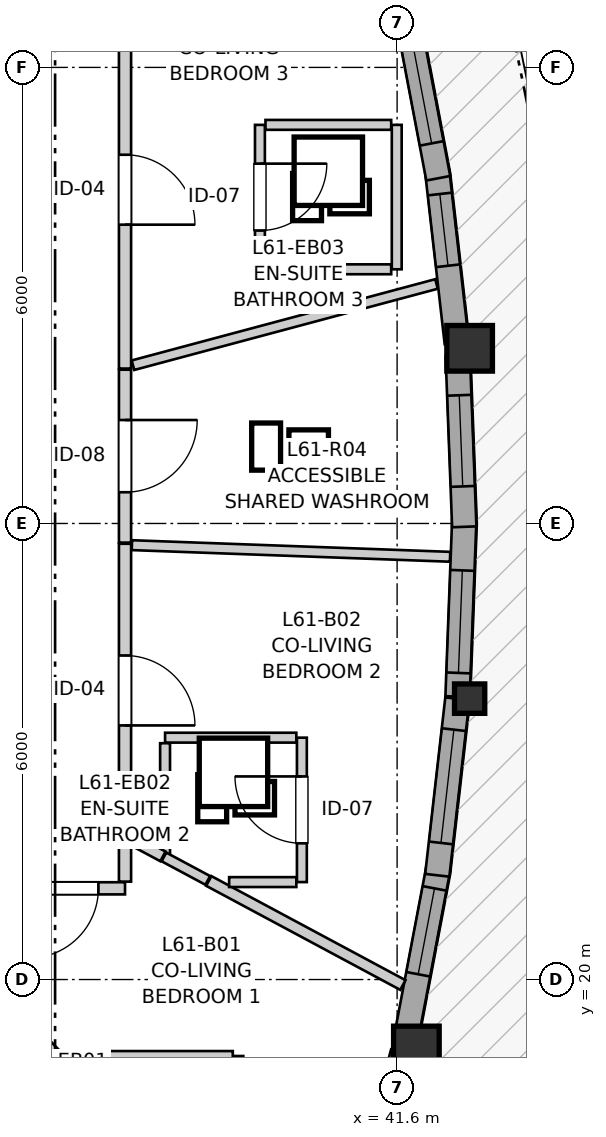
"""IFC4 building model, lengths in metres.
Left out: names, types, materials, properties, quantities, classifications, styles, units other than length and angle.
Written with IfcOpenShell. Run it as: python <this file> out.ifc"""

import sys

from ifc_helpers import new_model, si_unit, direction, frame, frame_2d, origin, origin_2d, place, context, subcontext, project, spatial, rectangle, i_section, extrude, source, transform, mapped, element, fill, save


model = new_model("IFC4")
c1 = context("Model", 3, precision=1e-05, world=origin(), true_north=direction((0.0, 1.0)))
c2 = subcontext(c1, "Body", "Model", "MODEL_VIEW")
j1 = project(units=[si_unit("LENGTHUNIT", "METRE"), si_unit("PLANEANGLEUNIT", "RADIAN")], contexts=[c1])
p1 = place(None, origin())
s1 = spatial("IfcSite", under=j1, at=p1, CompositionType="ELEMENT")
p2 = place(p1, origin())
s2 = spatial("IfcBuilding", under=s1, at=p2, CompositionType="ELEMENT")
p3 = place(p2, frame((0.0, 0.0, 205.2)))
s3 = spatial("IfcBuildingStorey", under=s2, at=p3, CompositionType="ELEMENT", Elevation=205.2)
m1 = source(origin(), c2, "Body", "SweptSolid", [
    extrude(rectangle(XDim=0.6, YDim=0.6, at=origin_2d()), origin(), (0.0, 0.0, 1.0), 2.935),
])
p4 = place(p3, frame((41.854, 19.086, 0.0), z_axis=(0.0, 0.0, 1.0), x_axis=(1.0, 0.0, 0.0)))
e1 = element("IfcColumn", 1, at=p4, inside=s3, PredefinedType="COLUMN", context=c2, shape_type="MappedRepresentation", body=[
    mapped(m1, transform((0.0, 0.0, 0.0), x_axis=(1.0, 0.0, 0.0), y_axis=(0.0, 1.0, 0.0), z_axis=(0.0, 0.0, 1.0), scale=1.0)),
])
m2 = source(origin(), c2, "Body", "SweptSolid", [
    extrude(i_section(OverallWidth=0.398, OverallDepth=0.387, WebThickness=0.019, FlangeThickness=0.03, FilletRadius=0.015, at=origin_2d()), origin(), (0.0, 0.0, 1.0), 2.935),
])
p5 = place(p3, frame((42.554, 23.696, 0.0), z_axis=(0.0, 0.0, 1.0), x_axis=(1.0, 0.0, 0.0)))
e2 = element("IfcColumn", 2, at=p5, inside=s3, PredefinedType="PILASTER", context=c2, shape_type="MappedRepresentation", body=[
    mapped(m2, transform((0.0, 0.0, 0.0), x_axis=(1.0, 0.0, 0.0), y_axis=(0.0, 1.0, 0.0), z_axis=(0.0, 0.0, 1.0), scale=1.0)),
])
p6 = place(p3, frame((42.554, 28.304, 0.0), z_axis=(0.0, 0.0, 1.0), x_axis=(1.0, 0.0, 0.0)))
e3 = element("IfcColumn", 3, at=p6, inside=s3, PredefinedType="COLUMN", context=c2, shape_type="MappedRepresentation", body=[
    mapped(m1, transform((0.0, 0.0, 0.0), x_axis=(1.0, 0.0, 0.0), y_axis=(0.0, 1.0, 0.0), z_axis=(0.0, 0.0, 1.0), scale=1.0)),
])
p7 = place(p3, frame((41.076, 16.786, 0.0), z_axis=(0.0, 0.0, 1.0), x_axis=(0.257037260973, 0.966401493413, 0.0)))
e4 = element("IfcWall", 4, at=p7, inside=s3, PredefinedType="SOLIDWALL", context=c2, shape_type="SweptSolid", body=[
    extrude(rectangle(XDim=2.333, YDim=0.32, at=frame_2d((1.167, 0.0))), origin(), (0.0, 0.0, 1.0), 2.555),
])
p8 = place(p7, frame((0.446, 0.0, 0.82)))
e5 = element("IfcOpeningElement", 5, at=p8, cuts=e4, PredefinedType="OPENING", context=c2, shape_type="SweptSolid", body=[
    extrude(rectangle(XDim=1.45, YDim=1.25, at=frame_2d((0.725, 0.625))), frame((0.0, 0.17, 0.0), z_axis=(0.0, -1.0, 0.0), x_axis=(1.0, 0.0, 0.0)), (0.0, 0.0, 1.0), 0.34),
])
p9 = place(p3, frame((41.713, 19.205, 0.0), z_axis=(0.0, 0.0, 1.0), x_axis=(0.186691464441, 0.982418595663, 0.0)))
e6 = element("IfcWall", 6, at=p9, inside=s3, PredefinedType="SOLIDWALL", context=c2, shape_type="SweptSolid", body=[
    extrude(rectangle(XDim=2.294, YDim=0.32, at=frame_2d((1.147, 0.0))), origin(), (0.0, 0.0, 1.0), 2.555),
])
p10 = place(p9, frame((0.88, 0.0, 0.82)))
e7 = element("IfcOpeningElement", 7, at=p10, cuts=e6, PredefinedType="OPENING", context=c2, shape_type="SweptSolid", body=[
    extrude(rectangle(XDim=1.15, YDim=1.2, at=frame_2d((0.575, 0.6))), frame((0.0, 0.17, 0.0), z_axis=(0.0, -1.0, 0.0), x_axis=(1.0, 0.0, 0.0)), (0.0, 0.0, 1.0), 0.34),
])
p11 = place(p3, frame((42.128, 21.371, 0.0), z_axis=(0.0, 0.0, 1.0), x_axis=(0.113319777802, 0.993558567956, 0.0)))
e8 = element("IfcWall", 8, at=p11, inside=s3, PredefinedType="SOLIDWALL", context=c2, shape_type="SweptSolid", body=[
    extrude(rectangle(XDim=2.338, YDim=0.32, at=frame_2d((1.169, 0.0))), origin(), (0.0, 0.0, 1.0), 2.555),
])
p12 = place(p11, frame((0.429, 0.0, 0.82)))
e9 = element("IfcOpeningElement", 9, at=p12, cuts=e8, PredefinedType="OPENING", context=c2, shape_type="SweptSolid", body=[
    extrude(rectangle(XDim=1.5, YDim=1.45, at=frame_2d((0.75, 0.725))), frame((0.0, 0.17, 0.0), z_axis=(0.0, -1.0, 0.0), x_axis=(1.0, 0.0, 0.0)), (0.0, 0.0, 1.0), 0.34),
])
p13 = place(p3, frame((42.395, 23.722, 0.0), z_axis=(0.0, 0.0, 1.0), x_axis=(0.038025668885, 0.999276762717, 0.0)))
e10 = element("IfcWall", 10, at=p13, inside=s3, PredefinedType="SOLIDWALL", context=c2, shape_type="SweptSolid", body=[
    extrude(rectangle(XDim=2.324, YDim=0.32, at=frame_2d((1.162, 0.0))), origin(), (0.0, 0.0, 1.0), 2.555),
])
p14 = place(p13, frame((0.312, 0.0, 0.82)))
e11 = element("IfcOpeningElement", 11, at=p14, cuts=e10, PredefinedType="OPENING", context=c2, shape_type="SweptSolid", body=[
    extrude(rectangle(XDim=1.35, YDim=1.45, at=frame_2d((0.675, 0.725))), frame((0.0, 0.17, 0.0), z_axis=(0.0, -1.0, 0.0), x_axis=(1.0, 0.0, 0.0)), (0.0, 0.0, 1.0), 0.34),
])
p15 = place(p3, frame((42.483, 25.956, 0.0), z_axis=(0.0, 0.0, 1.0), x_axis=(-0.038013039165, 0.999277243238, 0.0)))
e12 = element("IfcWall", 12, at=p15, inside=s3, PredefinedType="SOLIDWALL", context=c2, shape_type="SweptSolid", body=[
    extrude(rectangle(XDim=2.254, YDim=0.32, at=frame_2d((1.127, 0.0))), origin(), (0.0, 0.0, 1.0), 2.555),
])
p16 = place(p15, frame((0.532, 0.0, 0.82)))
e13 = element("IfcOpeningElement", 13, at=p16, cuts=e12, PredefinedType="OPENING", context=c2, shape_type="SweptSolid", body=[
    extrude(rectangle(XDim=1.2, YDim=1.45, at=frame_2d((0.6, 0.725))), frame((0.0, 0.17, 0.0), z_axis=(0.0, -1.0, 0.0), x_axis=(1.0, 0.0, 0.0)), (0.0, 0.0, 1.0), 0.34),
])
p17 = place(p3, frame((42.385, 28.376, 0.0), z_axis=(0.0, 0.0, 1.0), x_axis=(-0.113267221285, 0.993564560853, 0.0)))
e14 = element("IfcWall", 14, at=p17, inside=s3, PredefinedType="SOLIDWALL", context=c2, shape_type="SweptSolid", body=[
    extrude(rectangle(XDim=2.268, YDim=0.32, at=frame_2d((1.134, 0.0))), origin(), (0.0, 0.0, 1.0), 2.555),
])
p18 = place(p17, frame((1.021, 0.0, 0.82)))
e15 = element("IfcOpeningElement", 15, at=p18, cuts=e14, PredefinedType="OPENING", context=c2, shape_type="SweptSolid", body=[
    extrude(rectangle(XDim=0.95, YDim=1.35, at=frame_2d((0.475, 0.675))), frame((0.0, 0.17, 0.0), z_axis=(0.0, -1.0, 0.0), x_axis=(1.0, 0.0, 0.0)), (0.0, 0.0, 1.0), 0.34),
])
p19 = place(p3, frame((42.141, 30.542, 0.0), z_axis=(0.0, 0.0, 1.0), x_axis=(-0.186632734065, 0.982429754525, 0.0)))
e16 = element("IfcWall", 16, at=p19, inside=s3, PredefinedType="SOLIDWALL", context=c2, shape_type="SweptSolid", body=[
    extrude(rectangle(XDim=2.364, YDim=0.32, at=frame_2d((1.182, 0.0))), origin(), (0.0, 0.0, 1.0), 2.555),
])
p20 = place(p19, frame((0.467, 0.0, 0.82)))
e17 = element("IfcOpeningElement", 17, at=p20, cuts=e16, PredefinedType="OPENING", context=c2, shape_type="SweptSolid", body=[
    extrude(rectangle(XDim=1.45, YDim=1.25, at=frame_2d((0.725, 0.625))), frame((0.0, 0.17, 0.0), z_axis=(0.0, -1.0, 0.0), x_axis=(1.0, 0.0, 0.0)), (0.0, 0.0, 1.0), 0.34),
])
p21 = place(p3, frame((38.02, 32.748, 0.0), z_axis=(0.0, 0.0, 1.0), x_axis=(0.0, -1.0, 0.0)))
e18 = element("IfcWall", 18, at=p21, inside=s3, PredefinedType="PARTITIONING", context=c2, shape_type="SweptSolid", body=[
    extrude(rectangle(XDim=4.71, YDim=0.16, at=frame_2d((2.355, 0.0))), origin(), (0.0, 0.0, 1.0), 2.603),
])
p22 = place(p21, frame((1.897, 0.0, 0.0)))
e19 = element("IfcOpeningElement", 19, at=p22, cuts=e18, PredefinedType="OPENING", context=c2, shape_type="SweptSolid", body=[
    extrude(rectangle(XDim=0.92, YDim=2.1, at=frame_2d((0.46, 1.05))), frame((0.0, 0.09, 0.0), z_axis=(0.0, -1.0, 0.0), x_axis=(1.0, 0.0, 0.0)), (0.0, 0.0, 1.0), 0.18),
])
p23 = place(p3, frame((38.02, 25.733, 0.0), z_axis=(0.0, 0.0, 1.0), x_axis=(0.0, -1.0, 0.0)))
e20 = element("IfcWall", 20, at=p23, inside=s3, PredefinedType="PARTITIONING", context=c2, shape_type="SweptSolid", body=[
    extrude(rectangle(XDim=3.862, YDim=0.16, at=frame_2d((1.931, 0.0))), origin(), (0.0, 0.0, 1.0), 2.935),
])
p24 = place(p23, frame((1.47, 0.0, 0.0)))
e21 = element("IfcOpeningElement", 21, at=p24, cuts=e20, PredefinedType="OPENING", context=c2, shape_type="SweptSolid", body=[
    extrude(rectangle(XDim=0.92, YDim=2.1, at=frame_2d((0.46, 1.05))), frame((0.0, 0.09, 0.0), z_axis=(0.0, -1.0, 0.0), x_axis=(1.0, 0.0, 0.0)), (0.0, 0.0, 1.0), 0.18),
])
p25 = place(p3, frame((38.02, 28.023, 0.0), z_axis=(0.0, 0.0, 1.0), x_axis=(0.0, -1.0, 0.0)))
e22 = element("IfcWall", 22, at=p25, inside=s3, PredefinedType="PARTITIONING", context=c2, shape_type="SweptSolid", body=[
    extrude(rectangle(XDim=2.275, YDim=0.16, at=frame_2d((1.137, 0.0))), origin(), (0.0, 0.0, 1.0), 2.935),
])
p26 = place(p25, frame((0.662, 0.0, 0.0)))
e23 = element("IfcOpeningElement", 23, at=p26, cuts=e22, PredefinedType="OPENING", context=c2, shape_type="SweptSolid", body=[
    extrude(rectangle(XDim=0.95, YDim=2.1, at=frame_2d((0.475, 1.05))), frame((0.0, 0.09, 0.0), z_axis=(0.0, -1.0, 0.0), x_axis=(1.0, 0.0, 0.0)), (0.0, 0.0, 1.0), 0.18),
])
p27 = place(p3, frame((39.511, 17.094, 0.0), z_axis=(0.0, 0.0, 1.0), x_axis=(0.0, 1.0, 0.0)))
e24 = element("IfcWall", 24, at=p27, inside=s3, PredefinedType="PARTITIONING", context=c2, shape_type="SweptSolid", body=[
    extrude(rectangle(XDim=1.9, YDim=0.13, at=frame_2d((0.95, 0.0))), origin(), (0.0, 0.0, 1.0), 2.935),
])
p28 = place(p27, frame((0.51, 0.0, 0.0)))
e25 = element("IfcOpeningElement", 25, at=p28, cuts=e24, PredefinedType="OPENING", context=c2, shape_type="SweptSolid", body=[
    extrude(rectangle(XDim=0.88, YDim=2.05, at=frame_2d((0.44, 1.025))), frame((0.0, 0.075, 0.0), z_axis=(0.0, -1.0, 0.0), x_axis=(1.0, 0.0, 0.0)), (0.0, 0.0, 1.0), 0.15),
])
p29 = place(p3, frame((40.347, 21.282, 0.0), z_axis=(0.0, 0.0, 1.0), x_axis=(0.0, 1.0, 0.0)))
e26 = element("IfcWall", 26, at=p29, inside=s3, PredefinedType="PARTITIONING", context=c2, shape_type="SweptSolid", body=[
    extrude(rectangle(XDim=1.9, YDim=0.13, at=frame_2d((0.95, 0.0))), origin(), (0.0, 0.0, 1.0), 2.573),
])
p30 = place(p29, frame((0.51, 0.0, 0.0)))
e27 = element("IfcOpeningElement", 27, at=p30, cuts=e26, PredefinedType="OPENING", context=c2, shape_type="SweptSolid", body=[
    extrude(rectangle(XDim=0.88, YDim=2.05, at=frame_2d((0.44, 1.025))), frame((0.0, 0.075, 0.0), z_axis=(0.0, -1.0, 0.0), x_axis=(1.0, 0.0, 0.0)), (0.0, 0.0, 1.0), 0.15),
])
p31 = place(p3, frame((39.795, 31.244, 0.0), z_axis=(0.0, 0.0, 1.0), x_axis=(0.0, -1.0, 0.0)))
e28 = element("IfcWall", 28, at=p31, inside=s3, PredefinedType="PARTITIONING", context=c2, shape_type="SweptSolid", body=[
    extrude(rectangle(XDim=1.9, YDim=0.13, at=frame_2d((0.95, 0.0))), origin(), (0.0, 0.0, 1.0), 2.573),
])
p32 = place(p31, frame((0.51, 0.0, 0.0)))
e29 = element("IfcOpeningElement", 29, at=p32, cuts=e28, PredefinedType="OPENING", context=c2, shape_type="SweptSolid", body=[
    extrude(rectangle(XDim=0.88, YDim=2.05, at=frame_2d((0.44, 1.025))), frame((0.0, 0.075, 0.0), z_axis=(0.0, -1.0, 0.0), x_axis=(1.0, 0.0, 0.0)), (0.0, 0.0, 1.0), 0.15),
])
p33 = place(p3, frame((38.02, 21.2, 0.0), z_axis=(0.0, 0.0, 1.0), x_axis=(-1.0, 0.0, 0.0)))
e30 = element("IfcWall", 30, at=p33, inside=s3, PredefinedType="PARTITIONING", context=c2, shape_type="SweptSolid", body=[
    extrude(rectangle(XDim=1.612, YDim=0.16, at=frame_2d((0.806, 0.0))), origin(), (0.0, 0.0, 1.0), 2.935),
])
p34 = place(p33, frame((0.35, 0.0, 0.0)))
e31 = element("IfcOpeningElement", 31, at=p34, cuts=e30, PredefinedType="OPENING", context=c2, shape_type="SweptSolid", body=[
    extrude(rectangle(XDim=0.92, YDim=2.1, at=frame_2d((0.46, 1.05))), frame((0.0, 0.09, 0.0), z_axis=(0.0, -1.0, 0.0), x_axis=(1.0, 0.0, 0.0)), (0.0, 0.0, 1.0), 0.18),
])
p35 = place(p3, frame((38.11, 25.715, 0.0), z_axis=(0.0, 0.0, 1.0), x_axis=(0.99933433165, -0.036481414253, 0.0)))
e32 = element("IfcWall", 32, at=p35, inside=s3, PredefinedType="PARTITIONING", context=c2, shape_type="SweptSolid", body=[
    extrude(rectangle(XDim=4.189, YDim=0.13, at=frame_2d((2.095, 0.0))), origin(), (0.0, 0.0, 1.0), 2.935),
])
p36 = place(p3, frame((38.125, 28.082, 0.0), z_axis=(0.0, 0.0, 1.0), x_axis=(0.965997321458, 0.258552073934, 0.0)))
e33 = element("IfcWall", 33, at=p36, inside=s3, PredefinedType="PARTITIONING", context=c2, shape_type="SweptSolid", body=[
    extrude(rectangle(XDim=4.134, YDim=0.13, at=frame_2d((2.067, 0.0))), origin(), (0.0, 0.0, 1.0), 2.935),
])
p37 = place(p3, frame((39.122, 21.297, 0.0), z_axis=(0.0, 0.0, 1.0), x_axis=(0.881308328415, -0.472541670402, 0.0)))
e34 = element("IfcWall", 34, at=p37, inside=s3, PredefinedType="PARTITIONING", context=c2, shape_type="SweptSolid", body=[
    extrude(rectangle(XDim=2.898, YDim=0.145, at=frame_2d((1.449, 0.0))), origin(), (0.0, 0.0, 1.0), 2.935),
])
p38 = place(p3, frame((36.458, 19.686, 0.0), z_axis=(0.0, 0.0, 1.0), x_axis=(0.695231916786, -0.718785490868, 0.0)))
e35 = element("IfcWall", 35, at=p38, inside=s3, PredefinedType="PARTITIONING", context=c2, shape_type="SweptSolid", body=[
    extrude(rectangle(XDim=1.824, YDim=0.145, at=frame_2d((0.912, 0.0))), origin(), (0.0, 0.0, 1.0), 2.935),
])
p39 = place(p3, frame((41.595, 29.344, 0.0), z_axis=(0.0, 0.0, 1.0), x_axis=(0.0, 1.0, 0.0)))
e36 = element("IfcWall", 36, at=p39, inside=s3, PredefinedType="PARTITIONING", context=c2, shape_type="SweptSolid", body=[
    extrude(rectangle(XDim=1.9, YDim=0.13, at=frame_2d((0.95, 0.0))), origin(), (0.0, 0.0, 1.0), 2.935),
])
p40 = place(p3, frame((37.711, 18.994, 0.0), z_axis=(0.0, 0.0, 1.0), x_axis=(1.0, 0.0, 0.0)))
e37 = element("IfcWall", 37, at=p40, inside=s3, PredefinedType="PARTITIONING", context=c2, shape_type="SweptSolid", body=[
    extrude(rectangle(XDim=1.727, YDim=0.13, at=frame_2d((0.864, 0.0))), origin(), (0.0, 0.0, 1.0), 2.935),
])
p41 = place(p3, frame((38.547, 23.182, 0.0), z_axis=(0.0, 0.0, 1.0), x_axis=(1.0, 0.0, 0.0)))
e38 = element("IfcWall", 38, at=p41, inside=s3, PredefinedType="PARTITIONING", context=c2, shape_type="SweptSolid", body=[
    extrude(rectangle(XDim=1.727, YDim=0.13, at=frame_2d((0.863, 0.0))), origin(), (0.0, 0.0, 1.0), 2.935),
])
for number, where, z_axis, x_axis in (
    (39, (39.868, 31.244, 0.0), (0.0, 0.0, 1.0), (1.0, 0.0, 0.0)),
    (40, (39.868, 29.344, 0.0), (0.0, 0.0, 1.0), (1.0, 0.0, 0.0)),
):
    element("IfcWall", number, at=place(p3, frame(where, z_axis=z_axis, x_axis=x_axis)), inside=s3, PredefinedType="PARTITIONING", context=c2, shape_type="SweptSolid", body=[
        extrude(rectangle(XDim=1.654, YDim=0.13, at=frame_2d((0.827, 0.0))), origin(), (0.0, 0.0, 1.0), 2.935),
    ])
p42 = place(p3, frame((38.547, 21.605, 0.0), z_axis=(0.0, 0.0, 1.0), x_axis=(0.0, 1.0, 0.0)))
e41 = element("IfcWall", 41, at=p42, inside=s3, PredefinedType="PARTITIONING", context=c2, shape_type="SweptSolid", body=[
    extrude(rectangle(XDim=1.504, YDim=0.13, at=frame_2d((0.752, 0.0))), origin(), (0.0, 0.0, 1.0), 2.603),
])
p43 = place(p3, frame((39.39, 21.282, 0.0), z_axis=(0.0, 0.0, 1.0), x_axis=(1.0, 0.0, 0.0)))
e42 = element("IfcWall", 42, at=p43, inside=s3, PredefinedType="PARTITIONING", context=c2, shape_type="SweptSolid", body=[
    extrude(rectangle(XDim=0.884, YDim=0.13, at=frame_2d((0.442, 0.0))), origin(), (0.0, 0.0, 1.0), 2.935),
])
p44 = place(p3, frame((38.02, 21.288, 0.0), z_axis=(0.0, 0.0, 1.0), x_axis=(0.0, 1.0, 0.0)))
e43 = element("IfcWall", 43, at=p44, inside=s3, PredefinedType="PARTITIONING", context=c2, shape_type="SweptSolid", body=[
    extrude(rectangle(XDim=0.568, YDim=0.16, at=frame_2d((0.284, 0.0))), origin(), (0.0, 0.0, 1.0), 2.935),
])
p45 = place(p3, frame((38.532, 21.613, 0.0), z_axis=(0.0, 0.0, 1.0), x_axis=(0.881618593919, -0.471962556626, 0.0)))
e44 = element("IfcWall", 44, at=p45, inside=s3, PredefinedType="PARTITIONING", context=c2, shape_type="SweptSolid", body=[
    extrude(rectangle(XDim=0.654, YDim=0.13, at=frame_2d((0.327, 0.0))), origin(), (0.0, 0.0, 1.0), 2.935),
])
p46 = place(p3, frame((38.06, 21.867, 0.0), z_axis=(0.0, 0.0, 1.0), x_axis=(0.881026965879, -0.473066047601, 0.0)))
e45 = element("IfcWall", 45, at=p46, inside=s3, PredefinedType="PARTITIONING", context=c2, shape_type="SweptSolid", body=[
    extrude(rectangle(XDim=0.521, YDim=0.145, at=frame_2d((0.261, 0.0))), origin(), (0.0, 0.0, 1.0), 2.935),
])
m3 = source(origin(), c2, "Body", "SweptSolid", [
    extrude(rectangle(XDim=1.15, YDim=1.2, at=frame_2d((0.575, 0.6))), frame((0.0, 0.03, 0.0), z_axis=(0.0, -1.0, 0.0), x_axis=(1.0, 0.0, 0.0)), (0.0, 0.0, 1.0), 0.06),
])
p47 = place(p10, origin())
e46 = element("IfcWindow", 46, at=p47, inside=s3, PartitioningType="SINGLE_PANEL", PredefinedType="WINDOW", context=c2, shape_type="MappedRepresentation", body=[
    mapped(m3, transform((0.0, 0.0, 0.0), x_axis=(1.0, 0.0, 0.0), y_axis=(0.0, 1.0, 0.0), z_axis=(0.0, 0.0, 1.0), scale=1.0)),
])
fill(e7, e46)
m4 = source(origin(), c2, "Body", "SweptSolid", [
    extrude(rectangle(XDim=1.5, YDim=1.45, at=frame_2d((0.75, 0.725))), frame((0.0, 0.03, 0.0), z_axis=(0.0, -1.0, 0.0), x_axis=(1.0, 0.0, 0.0)), (0.0, 0.0, 1.0), 0.06),
])
p48 = place(p12, origin())
e47 = element("IfcWindow", 47, at=p48, inside=s3, PartitioningType="SINGLE_PANEL", PredefinedType="WINDOW", context=c2, shape_type="MappedRepresentation", body=[
    mapped(m4, transform((0.0, 0.0, 0.0), x_axis=(1.0, 0.0, 0.0), y_axis=(0.0, 1.0, 0.0), z_axis=(0.0, 0.0, 1.0), scale=1.0)),
])
fill(e9, e47)
m5 = source(origin(), c2, "Body", "SweptSolid", [
    extrude(rectangle(XDim=1.35, YDim=1.45, at=frame_2d((0.675, 0.725))), frame((0.0, 0.03, 0.0), z_axis=(0.0, -1.0, 0.0), x_axis=(1.0, 0.0, 0.0)), (0.0, 0.0, 1.0), 0.06),
])
p49 = place(p14, origin())
e48 = element("IfcWindow", 48, at=p49, inside=s3, PartitioningType="SINGLE_PANEL", PredefinedType="WINDOW", context=c2, shape_type="MappedRepresentation", body=[
    mapped(m5, transform((0.0, 0.0, 0.0), x_axis=(1.0, 0.0, 0.0), y_axis=(0.0, 1.0, 0.0), z_axis=(0.0, 0.0, 1.0), scale=1.0)),
])
fill(e11, e48)
m6 = source(origin(), c2, "Body", "SweptSolid", [
    extrude(rectangle(XDim=1.2, YDim=1.45, at=frame_2d((0.6, 0.725))), frame((0.0, 0.03, 0.0), z_axis=(0.0, -1.0, 0.0), x_axis=(1.0, 0.0, 0.0)), (0.0, 0.0, 1.0), 0.06),
])
p50 = place(p16, origin())
e49 = element("IfcWindow", 49, at=p50, inside=s3, PartitioningType="SINGLE_PANEL", PredefinedType="WINDOW", context=c2, shape_type="MappedRepresentation", body=[
    mapped(m6, transform((0.0, 0.0, 0.0), x_axis=(1.0, 0.0, 0.0), y_axis=(0.0, 1.0, 0.0), z_axis=(0.0, 0.0, 1.0), scale=1.0)),
])
fill(e13, e49)
m7 = source(origin(), c2, "Body", "SweptSolid", [
    extrude(rectangle(XDim=0.95, YDim=1.35, at=frame_2d((0.475, 0.675))), frame((0.0, 0.03, 0.0), z_axis=(0.0, -1.0, 0.0), x_axis=(1.0, 0.0, 0.0)), (0.0, 0.0, 1.0), 0.06),
])
p51 = place(p18, origin())
e50 = element("IfcWindow", 50, at=p51, inside=s3, PartitioningType="SINGLE_PANEL", PredefinedType="WINDOW", context=c2, shape_type="MappedRepresentation", body=[
    mapped(m7, transform((0.0, 0.0, 0.0), x_axis=(1.0, 0.0, 0.0), y_axis=(0.0, 1.0, 0.0), z_axis=(0.0, 0.0, 1.0), scale=1.0)),
])
fill(e15, e50)
m8 = source(origin(), c2, "Body", "SweptSolid", [
    extrude(rectangle(XDim=1.45, YDim=1.25, at=frame_2d((0.725, 0.625))), frame((0.0, 0.03, 0.0), z_axis=(0.0, -1.0, 0.0), x_axis=(1.0, 0.0, 0.0)), (0.0, 0.0, 1.0), 0.06),
])
p52 = place(p20, origin())
e51 = element("IfcWindow", 51, at=p52, inside=s3, PartitioningType="SINGLE_PANEL", PredefinedType="WINDOW", context=c2, shape_type="MappedRepresentation", body=[
    mapped(m8, transform((0.0, 0.0, 0.0), x_axis=(1.0, 0.0, 0.0), y_axis=(0.0, 1.0, 0.0), z_axis=(0.0, 0.0, 1.0), scale=1.0)),
])
fill(e17, e51)
m9 = source(origin(), c2, "Body", "SweptSolid", [
    extrude(rectangle(XDim=0.92, YDim=2.1, at=frame_2d((0.46, 1.05))), frame((0.0, 0.025, 0.0), z_axis=(0.0, -1.0, 0.0), x_axis=(1.0, 0.0, 0.0)), (0.0, 0.0, 1.0), 0.05),
])
p53 = place(p22, origin())
e52 = element("IfcDoor", 52, at=p53, inside=s3, OperationType="SINGLE_SWING_RIGHT", PredefinedType="DOOR", context=c2, shape_type="MappedRepresentation", body=[
    mapped(m9, transform((0.0, 0.0, 0.0), x_axis=(1.0, 0.0, 0.0), y_axis=(0.0, 1.0, 0.0), z_axis=(0.0, 0.0, 1.0), scale=1.0)),
])
fill(e19, e52)
p54 = place(p24, origin())
e53 = element("IfcDoor", 53, at=p54, inside=s3, OperationType="SINGLE_SWING_RIGHT", PredefinedType="DOOR", context=c2, shape_type="MappedRepresentation", body=[
    mapped(m9, transform((0.0, 0.0, 0.0), x_axis=(1.0, 0.0, 0.0), y_axis=(0.0, 1.0, 0.0), z_axis=(0.0, 0.0, 1.0), scale=1.0)),
])
fill(e21, e53)
m10 = source(origin(), c2, "Body", "SweptSolid", [
    extrude(rectangle(XDim=0.95, YDim=2.1, at=frame_2d((0.475, 1.05))), frame((0.0, 0.025, 0.0), z_axis=(0.0, -1.0, 0.0), x_axis=(1.0, 0.0, 0.0)), (0.0, 0.0, 1.0), 0.05),
])
p55 = place(p26, origin())
e54 = element("IfcDoor", 54, at=p55, inside=s3, OperationType="SINGLE_SWING_LEFT", PredefinedType="DOOR", context=c2, shape_type="MappedRepresentation", body=[
    mapped(m10, transform((0.0, 0.0, 0.0), x_axis=(1.0, 0.0, 0.0), y_axis=(0.0, 1.0, 0.0), z_axis=(0.0, 0.0, 1.0), scale=1.0)),
])
fill(e23, e54)
m11 = source(origin(), c2, "Body", "SweptSolid", [
    extrude(rectangle(XDim=0.88, YDim=2.05, at=frame_2d((0.44, 1.025))), frame((0.0, 0.025, 0.0), z_axis=(0.0, -1.0, 0.0), x_axis=(1.0, 0.0, 0.0)), (0.0, 0.0, 1.0), 0.05),
])
p56 = place(p30, origin())
e55 = element("IfcDoor", 55, at=p56, inside=s3, OperationType="SINGLE_SWING_RIGHT", PredefinedType="DOOR", context=c2, shape_type="MappedRepresentation", body=[
    mapped(m11, transform((0.0, 0.0, 0.0), x_axis=(1.0, 0.0, 0.0), y_axis=(0.0, 1.0, 0.0), z_axis=(0.0, 0.0, 1.0), scale=1.0)),
])
fill(e27, e55)
p57 = place(p32, origin())
e56 = element("IfcDoor", 56, at=p57, inside=s3, OperationType="SINGLE_SWING_LEFT", PredefinedType="DOOR", context=c2, shape_type="MappedRepresentation", body=[
    mapped(m11, transform((0.0, 0.0, 0.0), x_axis=(1.0, 0.0, 0.0), y_axis=(0.0, 1.0, 0.0), z_axis=(0.0, 0.0, 1.0), scale=1.0)),
])
fill(e29, e56)
p58 = place(p34, origin())
e57 = element("IfcDoor", 57, at=p58, inside=s3, OperationType="SINGLE_SWING_RIGHT", PredefinedType="DOOR", context=c2, shape_type="MappedRepresentation", body=[
    mapped(m9, transform((0.0, 0.0, 0.0), x_axis=(1.0, 0.0, 0.0), y_axis=(0.0, 1.0, 0.0), z_axis=(0.0, 0.0, 1.0), scale=1.0)),
])
fill(e31, e57)
save(model, sys.argv[1])
